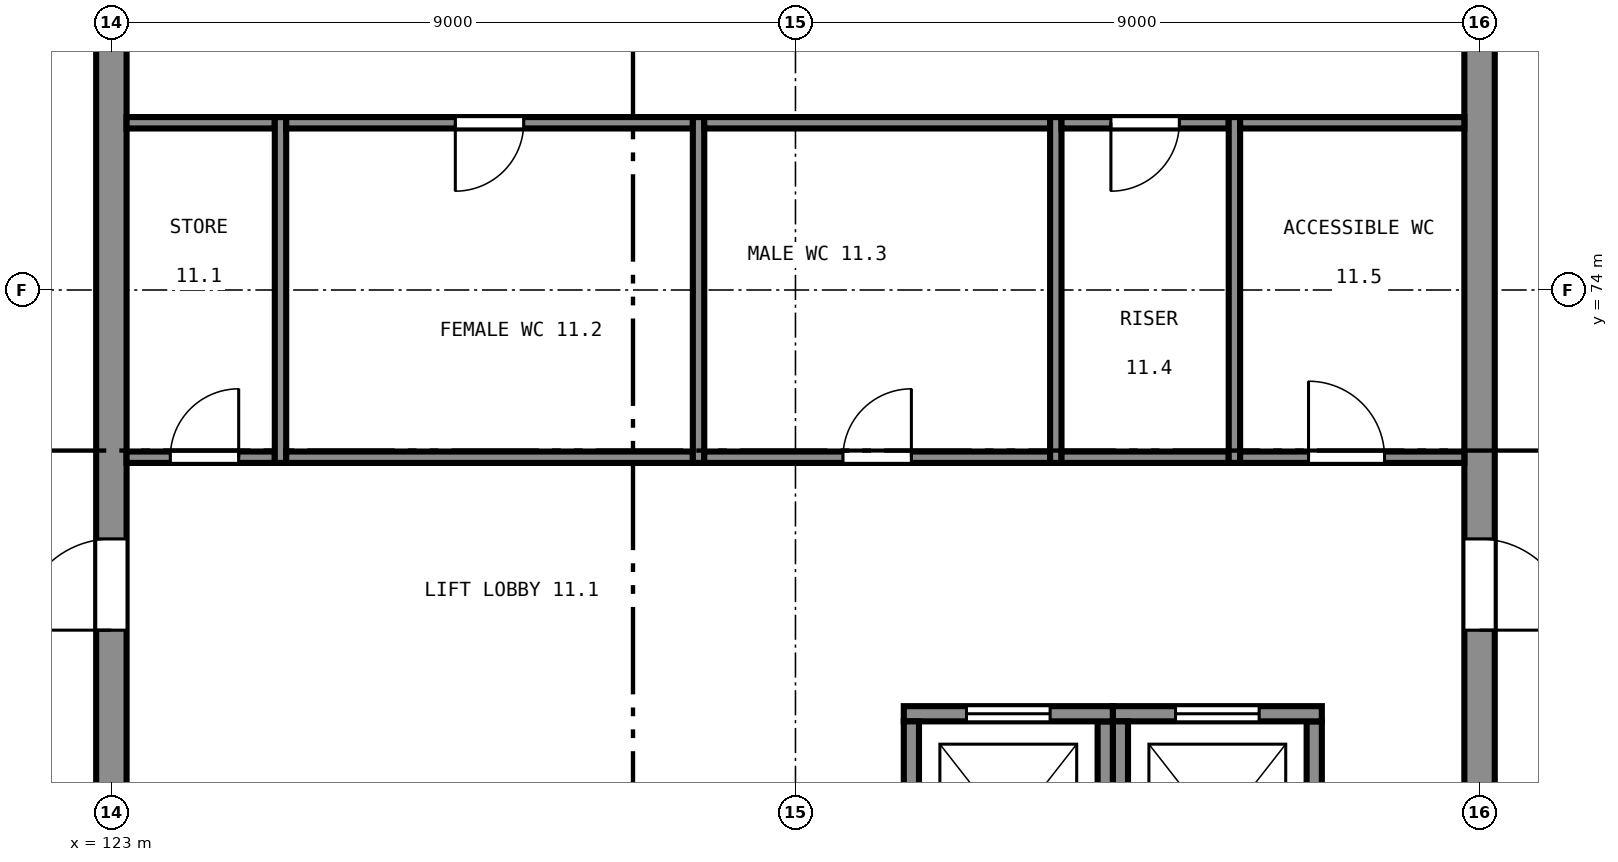
"""IFC4 building model, lengths in metres.
Left out: names, types, materials, properties, quantities, classifications, styles, units other than length and angle.
Written with IfcOpenShell. Run it as: python <this file> out.ifc"""

import sys

from ifc_helpers import new_model, si_unit, direction, frame, frame_2d, origin, place, context, subcontext, project, spatial, rectangle, extrude, element, fill, save


model = new_model("IFC4")
c1 = context("Model", 3, precision=1e-05, world=origin(), true_north=direction((0.0, 1.0)))
c2 = subcontext(c1, "Body", "Model", "MODEL_VIEW")
j1 = project(units=[si_unit("LENGTHUNIT", "METRE"), si_unit("PLANEANGLEUNIT", "RADIAN")], contexts=[c1])
p1 = place(None, origin())
s1 = spatial("IfcSite", under=j1, at=p1, CompositionType="ELEMENT")
p2 = place(p1, origin())
s2 = spatial("IfcBuilding", under=s1, at=p2, CompositionType="ELEMENT")
p3 = place(p2, frame((0.0, 0.0, 45.5)))
s3 = spatial("IfcBuildingStorey", under=s2, at=p3, CompositionType="ELEMENT", Elevation=45.5)
p4 = place(p3, frame((141.0, 65.2, 0.0), z_axis=(0.0, 0.0, 1.0), x_axis=(0.0, 1.0, 0.0)))
e1 = element("IfcWall", 1, at=p4, inside=s3, PredefinedType="SHEAR", context=c2, shape_type="SweptSolid", body=[
    extrude(rectangle(XDim=17.6, YDim=0.4, at=frame_2d((8.8, 0.0))), origin(), (0.0, 0.0, 1.0), 4.0),
])
p5 = place(p4, frame((4.325, 0.0, 0.0)))
e2 = element("IfcOpeningElement", 2, at=p5, cuts=e1, PredefinedType="OPENING", context=c2, shape_type="SweptSolid", body=[
    extrude(rectangle(XDim=1.2, YDim=2.1, at=frame_2d((0.6, 1.05))), frame((0.0, 0.21, 0.0), z_axis=(0.0, -1.0, 0.0), x_axis=(1.0, 0.0, 0.0)), (0.0, 0.0, 1.0), 0.42),
])
p6 = place(p4, frame((12.075, 0.0, 0.0)))
e3 = element("IfcOpeningElement", 3, at=p6, cuts=e1, PredefinedType="OPENING", context=c2, shape_type="SweptSolid", body=[
    extrude(rectangle(XDim=1.2, YDim=2.1, at=frame_2d((0.6, 1.05))), frame((0.0, 0.21, 0.0), z_axis=(0.0, -1.0, 0.0), x_axis=(1.0, 0.0, 0.0)), (0.0, 0.0, 1.0), 0.42),
])
p7 = place(p3, frame((123.0, 82.8, 0.0), z_axis=(0.0, 0.0, 1.0), x_axis=(0.0, -1.0, 0.0)))
e4 = element("IfcWall", 4, at=p7, inside=s3, PredefinedType="SHEAR", context=c2, shape_type="SweptSolid", body=[
    extrude(rectangle(XDim=17.6, YDim=0.4, at=frame_2d((8.8, 0.0))), origin(), (0.0, 0.0, 1.0), 4.0),
])
p8 = place(p7, frame((12.075, 0.0, 0.0)))
e5 = element("IfcOpeningElement", 5, at=p8, cuts=e4, PredefinedType="OPENING", context=c2, shape_type="SweptSolid", body=[
    extrude(rectangle(XDim=1.2, YDim=2.1, at=frame_2d((0.6, 1.05))), frame((0.0, 0.21, 0.0), z_axis=(0.0, -1.0, 0.0), x_axis=(1.0, 0.0, 0.0)), (0.0, 0.0, 1.0), 0.42),
])
p9 = place(p7, frame((4.325, 0.0, 0.0)))
e6 = element("IfcOpeningElement", 6, at=p9, cuts=e4, PredefinedType="OPENING", context=c2, shape_type="SweptSolid", body=[
    extrude(rectangle(XDim=1.2, YDim=2.1, at=frame_2d((0.6, 1.05))), frame((0.0, 0.21, 0.0), z_axis=(0.0, -1.0, 0.0), x_axis=(1.0, 0.0, 0.0)), (0.0, 0.0, 1.0), 0.42),
])
p10 = place(p3, frame((136.075, 65.425, 0.0), z_axis=(0.0, 0.0, 1.0), x_axis=(0.0, 1.0, 0.0)))
e7 = element("IfcWall", 7, at=p10, inside=s3, PredefinedType="SHEAR", context=c2, shape_type="SweptSolid", body=[
    extrude(rectangle(XDim=2.9, YDim=0.2, at=frame_2d((1.45, 0.0))), origin(), (0.0, 0.0, 1.0), 4.0),
])
p11 = place(p3, frame((136.175, 68.425, 0.0), z_axis=(0.0, 0.0, 1.0), x_axis=(-1.0, 0.0, 0.0)))
e8 = element("IfcWall", 8, at=p11, inside=s3, PredefinedType="SHEAR", context=c2, shape_type="SweptSolid", body=[
    extrude(rectangle(XDim=2.75, YDim=0.2, at=frame_2d((1.375, 0.0))), origin(), (0.0, 0.0, 1.0), 4.0),
])
p12 = place(p11, frame((0.825, 0.0, 0.0)))
e9 = element("IfcOpeningElement", 9, at=p12, cuts=e8, PredefinedType="OPENING", context=c2, shape_type="SweptSolid", body=[
    extrude(rectangle(XDim=1.1, YDim=2.1, at=frame_2d((0.55, 1.05))), frame((0.0, 0.11, 0.0), z_axis=(0.0, -1.0, 0.0), x_axis=(1.0, 0.0, 0.0)), (0.0, 0.0, 1.0), 0.22),
])
for number, where, z_axis, x_axis in (
    (10, (133.525, 68.325, 0.0), (0.0, 0.0, 1.0), (0.0, -1.0, 0.0)),
    (11, (138.825, 65.425, 0.0), (0.0, 0.0, 1.0), (0.0, 1.0, 0.0)),
):
    element("IfcWall", number, at=place(p3, frame(where, z_axis=z_axis, x_axis=x_axis)), inside=s3, PredefinedType="SHEAR", context=c2, shape_type="SweptSolid", body=[
        extrude(rectangle(XDim=2.9, YDim=0.2, at=frame_2d((1.45, 0.0))), origin(), (0.0, 0.0, 1.0), 4.0),
    ])
p13 = place(p3, frame((138.925, 68.425, 0.0), z_axis=(0.0, 0.0, 1.0), x_axis=(-1.0, 0.0, 0.0)))
e12 = element("IfcWall", 12, at=p13, inside=s3, PredefinedType="SHEAR", context=c2, shape_type="SweptSolid", body=[
    extrude(rectangle(XDim=2.75, YDim=0.2, at=frame_2d((1.375, 0.0))), origin(), (0.0, 0.0, 1.0), 4.0),
])
p14 = place(p13, frame((0.825, 0.0, 0.0)))
e13 = element("IfcOpeningElement", 13, at=p14, cuts=e12, PredefinedType="OPENING", context=c2, shape_type="SweptSolid", body=[
    extrude(rectangle(XDim=1.1, YDim=2.1, at=frame_2d((0.55, 1.05))), frame((0.0, 0.11, 0.0), z_axis=(0.0, -1.0, 0.0), x_axis=(1.0, 0.0, 0.0)), (0.0, 0.0, 1.0), 0.22),
])
p15 = place(p3, frame((136.275, 68.325, 0.0), z_axis=(0.0, 0.0, 1.0), x_axis=(0.0, -1.0, 0.0)))
e14 = element("IfcWall", 14, at=p15, inside=s3, PredefinedType="SHEAR", context=c2, shape_type="SweptSolid", body=[
    extrude(rectangle(XDim=2.9, YDim=0.2, at=frame_2d((1.45, 0.0))), origin(), (0.0, 0.0, 1.0), 4.0),
])
p16 = place(p3, frame((125.225, 71.725, 0.0), z_axis=(0.0, 0.0, 1.0), x_axis=(0.0, 1.0, 0.0)))
e15 = element("IfcWall", 15, at=p16, inside=s3, PredefinedType="PARTITIONING", context=c2, shape_type="SweptSolid", body=[
    extrude(rectangle(XDim=4.55, YDim=0.15, at=frame_2d((2.275, 0.0))), origin(), (0.0, 0.0, 1.0), 3.75),
])
p17 = place(p3, frame((123.2, 71.8, 0.0), z_axis=(0.0, 0.0, 1.0), x_axis=(1.0, 0.0, 0.0)))
e16 = element("IfcWall", 16, at=p17, inside=s3, PredefinedType="PARTITIONING", context=c2, shape_type="SweptSolid", body=[
    extrude(rectangle(XDim=1.95, YDim=0.15, at=frame_2d((0.975, 0.0))), origin(), (0.0, 0.0, 1.0), 3.75),
])
p18 = place(p17, frame((0.575, 0.0, 0.0)))
e17 = element("IfcOpeningElement", 17, at=p18, cuts=e16, PredefinedType="OPENING", context=c2, shape_type="SweptSolid", body=[
    extrude(rectangle(XDim=0.9, YDim=2.1, at=frame_2d((0.45, 1.05))), frame((0.0, 0.085, 0.0), z_axis=(0.0, -1.0, 0.0), x_axis=(1.0, 0.0, 0.0)), (0.0, 0.0, 1.0), 0.17),
])
p19 = place(p3, frame((123.2, 76.2, 0.0), z_axis=(0.0, 0.0, 1.0), x_axis=(1.0, 0.0, 0.0)))
e18 = element("IfcWall", 18, at=p19, inside=s3, PredefinedType="PARTITIONING", context=c2, shape_type="SweptSolid", body=[
    extrude(rectangle(XDim=1.95, YDim=0.15, at=frame_2d((0.975, 0.0))), origin(), (0.0, 0.0, 1.0), 3.75),
])
p20 = place(p3, frame((130.725, 71.725, 0.0), z_axis=(0.0, 0.0, 1.0), x_axis=(0.0, 1.0, 0.0)))
e19 = element("IfcWall", 19, at=p20, inside=s3, PredefinedType="PARTITIONING", context=c2, shape_type="SweptSolid", body=[
    extrude(rectangle(XDim=4.55, YDim=0.15, at=frame_2d((2.275, 0.0))), origin(), (0.0, 0.0, 1.0), 3.75),
])
p21 = place(p3, frame((125.3, 71.8, 0.0), z_axis=(0.0, 0.0, 1.0), x_axis=(1.0, 0.0, 0.0)))
e20 = element("IfcWall", 20, at=p21, inside=s3, PredefinedType="PARTITIONING", context=c2, shape_type="SweptSolid", body=[
    extrude(rectangle(XDim=5.35, YDim=0.15, at=frame_2d((2.675, 0.0))), origin(), (0.0, 0.0, 1.0), 3.75),
])
p22 = place(p3, frame((125.3, 76.2, 0.0), z_axis=(0.0, 0.0, 1.0), x_axis=(1.0, 0.0, 0.0)))
e21 = element("IfcWall", 21, at=p22, inside=s3, PredefinedType="PARTITIONING", context=c2, shape_type="SweptSolid", body=[
    extrude(rectangle(XDim=5.35, YDim=0.15, at=frame_2d((2.675, 0.0))), origin(), (0.0, 0.0, 1.0), 3.75),
])
p23 = place(p22, frame((2.225, 0.0, 0.0)))
e22 = element("IfcOpeningElement", 22, at=p23, cuts=e21, PredefinedType="OPENING", context=c2, shape_type="SweptSolid", body=[
    extrude(rectangle(XDim=0.9, YDim=2.1, at=frame_2d((0.45, 1.05))), frame((0.0, 0.085, 0.0), z_axis=(0.0, -1.0, 0.0), x_axis=(1.0, 0.0, 0.0)), (0.0, 0.0, 1.0), 0.17),
])
p24 = place(p3, frame((135.425, 71.725, 0.0), z_axis=(0.0, 0.0, 1.0), x_axis=(0.0, 1.0, 0.0)))
e23 = element("IfcWall", 23, at=p24, inside=s3, PredefinedType="PARTITIONING", context=c2, shape_type="SweptSolid", body=[
    extrude(rectangle(XDim=4.55, YDim=0.15, at=frame_2d((2.275, 0.0))), origin(), (0.0, 0.0, 1.0), 3.75),
])
p25 = place(p3, frame((130.8, 71.8, 0.0), z_axis=(0.0, 0.0, 1.0), x_axis=(1.0, 0.0, 0.0)))
e24 = element("IfcWall", 24, at=p25, inside=s3, PredefinedType="PARTITIONING", context=c2, shape_type="SweptSolid", body=[
    extrude(rectangle(XDim=4.55, YDim=0.15, at=frame_2d((2.275, 0.0))), origin(), (0.0, 0.0, 1.0), 3.75),
])
p26 = place(p25, frame((1.825, 0.0, 0.0)))
e25 = element("IfcOpeningElement", 25, at=p26, cuts=e24, PredefinedType="OPENING", context=c2, shape_type="SweptSolid", body=[
    extrude(rectangle(XDim=0.9, YDim=2.1, at=frame_2d((0.45, 1.05))), frame((0.0, 0.085, 0.0), z_axis=(0.0, -1.0, 0.0), x_axis=(1.0, 0.0, 0.0)), (0.0, 0.0, 1.0), 0.17),
])
p27 = place(p3, frame((130.8, 76.2, 0.0), z_axis=(0.0, 0.0, 1.0), x_axis=(1.0, 0.0, 0.0)))
e26 = element("IfcWall", 26, at=p27, inside=s3, PredefinedType="PARTITIONING", context=c2, shape_type="SweptSolid", body=[
    extrude(rectangle(XDim=4.55, YDim=0.15, at=frame_2d((2.275, 0.0))), origin(), (0.0, 0.0, 1.0), 3.75),
])
p28 = place(p3, frame((137.775, 71.725, 0.0), z_axis=(0.0, 0.0, 1.0), x_axis=(0.0, 1.0, 0.0)))
e27 = element("IfcWall", 27, at=p28, inside=s3, PredefinedType="PARTITIONING", context=c2, shape_type="SweptSolid", body=[
    extrude(rectangle(XDim=4.55, YDim=0.15, at=frame_2d((2.275, 0.0))), origin(), (0.0, 0.0, 1.0), 3.75),
])
p29 = place(p3, frame((135.5, 71.8, 0.0), z_axis=(0.0, 0.0, 1.0), x_axis=(1.0, 0.0, 0.0)))
e28 = element("IfcWall", 28, at=p29, inside=s3, PredefinedType="PARTITIONING", context=c2, shape_type="SweptSolid", body=[
    extrude(rectangle(XDim=2.2, YDim=0.15, at=frame_2d((1.1, 0.0))), origin(), (0.0, 0.0, 1.0), 3.75),
])
p30 = place(p3, frame((135.5, 76.2, 0.0), z_axis=(0.0, 0.0, 1.0), x_axis=(1.0, 0.0, 0.0)))
e29 = element("IfcWall", 29, at=p30, inside=s3, PredefinedType="PARTITIONING", context=c2, shape_type="SweptSolid", body=[
    extrude(rectangle(XDim=2.2, YDim=0.15, at=frame_2d((1.1, 0.0))), origin(), (0.0, 0.0, 1.0), 3.75),
])
p31 = place(p30, frame((0.65, 0.0, 0.0)))
e30 = element("IfcOpeningElement", 30, at=p31, cuts=e29, PredefinedType="OPENING", context=c2, shape_type="SweptSolid", body=[
    extrude(rectangle(XDim=0.9, YDim=2.1, at=frame_2d((0.45, 1.05))), frame((0.0, 0.085, 0.0), z_axis=(0.0, -1.0, 0.0), x_axis=(1.0, 0.0, 0.0)), (0.0, 0.0, 1.0), 0.17),
])
p32 = place(p3, frame((137.85, 71.8, 0.0), z_axis=(0.0, 0.0, 1.0), x_axis=(1.0, 0.0, 0.0)))
e31 = element("IfcWall", 31, at=p32, inside=s3, PredefinedType="PARTITIONING", context=c2, shape_type="SweptSolid", body=[
    extrude(rectangle(XDim=2.95, YDim=0.15, at=frame_2d((1.475, 0.0))), origin(), (0.0, 0.0, 1.0), 3.75),
])
p33 = place(p32, frame((0.9, 0.0, 0.0)))
e32 = element("IfcOpeningElement", 32, at=p33, cuts=e31, PredefinedType="OPENING", context=c2, shape_type="SweptSolid", body=[
    extrude(rectangle(XDim=1.0, YDim=2.1, at=frame_2d((0.5, 1.05))), frame((0.0, 0.085, 0.0), z_axis=(0.0, -1.0, 0.0), x_axis=(1.0, 0.0, 0.0)), (0.0, 0.0, 1.0), 0.17),
])
p34 = place(p3, frame((137.85, 76.2, 0.0), z_axis=(0.0, 0.0, 1.0), x_axis=(1.0, 0.0, 0.0)))
e33 = element("IfcWall", 33, at=p34, inside=s3, PredefinedType="PARTITIONING", context=c2, shape_type="SweptSolid", body=[
    extrude(rectangle(XDim=2.95, YDim=0.15, at=frame_2d((1.475, 0.0))), origin(), (0.0, 0.0, 1.0), 3.75),
])
p35 = place(p12, origin())
e34 = element("IfcDoor", 34, at=p35, inside=s3, OperationType="SLIDING_TO_LEFT", PredefinedType="DOOR", context=c2, shape_type="SweptSolid", body=[
    extrude(rectangle(XDim=1.1, YDim=2.1, at=frame_2d((0.55, 1.05))), frame((0.0, 0.025, 0.0), z_axis=(0.0, -1.0, 0.0), x_axis=(1.0, 0.0, 0.0)), (0.0, 0.0, 1.0), 0.05),
])
fill(e9, e34)
p36 = place(p14, origin())
e35 = element("IfcDoor", 35, at=p36, inside=s3, OperationType="SLIDING_TO_LEFT", PredefinedType="DOOR", context=c2, shape_type="SweptSolid", body=[
    extrude(rectangle(XDim=1.1, YDim=2.1, at=frame_2d((0.55, 1.05))), frame((0.0, 0.025, 0.0), z_axis=(0.0, -1.0, 0.0), x_axis=(1.0, 0.0, 0.0)), (0.0, 0.0, 1.0), 0.05),
])
fill(e13, e35)
p37 = place(p8, frame((1.2, 0.0, 0.0), z_axis=(0.0, 0.0, 1.0), x_axis=(-1.0, 0.0, 0.0)))
e36 = element("IfcDoor", 36, at=p37, inside=s3, OperationType="SINGLE_SWING_RIGHT", PredefinedType="DOOR", context=c2, shape_type="SweptSolid", body=[
    extrude(rectangle(XDim=1.2, YDim=2.1, at=frame_2d((0.6, 1.05))), frame((0.0, 0.025, 0.0), z_axis=(0.0, -1.0, 0.0), x_axis=(1.0, 0.0, 0.0)), (0.0, 0.0, 1.0), 0.05),
])
fill(e5, e36)
p38 = place(p5, frame((1.2, 0.0, 0.0), z_axis=(0.0, 0.0, 1.0), x_axis=(-1.0, 0.0, 0.0)))
e37 = element("IfcDoor", 37, at=p38, inside=s3, OperationType="SINGLE_SWING_LEFT", PredefinedType="DOOR", context=c2, shape_type="SweptSolid", body=[
    extrude(rectangle(XDim=1.2, YDim=2.1, at=frame_2d((0.6, 1.05))), frame((0.0, 0.025, 0.0), z_axis=(0.0, -1.0, 0.0), x_axis=(1.0, 0.0, 0.0)), (0.0, 0.0, 1.0), 0.05),
])
fill(e2, e37)
p39 = place(p18, origin())
e38 = element("IfcDoor", 38, at=p39, inside=s3, OperationType="SINGLE_SWING_LEFT", PredefinedType="DOOR", context=c2, shape_type="SweptSolid", body=[
    extrude(rectangle(XDim=0.9, YDim=2.1, at=frame_2d((0.45, 1.05))), frame((0.0, 0.025, 0.0), z_axis=(0.0, -1.0, 0.0), x_axis=(1.0, 0.0, 0.0)), (0.0, 0.0, 1.0), 0.05),
])
fill(e17, e38)
p40 = place(p23, frame((0.9, 0.0, 0.0), z_axis=(0.0, 0.0, 1.0), x_axis=(-1.0, 0.0, 0.0)))
e39 = element("IfcDoor", 39, at=p40, inside=s3, OperationType="SINGLE_SWING_LEFT", PredefinedType="DOOR", context=c2, shape_type="SweptSolid", body=[
    extrude(rectangle(XDim=0.9, YDim=2.1, at=frame_2d((0.45, 1.05))), frame((0.0, 0.025, 0.0), z_axis=(0.0, -1.0, 0.0), x_axis=(1.0, 0.0, 0.0)), (0.0, 0.0, 1.0), 0.05),
])
fill(e22, e39)
p41 = place(p26, origin())
e40 = element("IfcDoor", 40, at=p41, inside=s3, OperationType="SINGLE_SWING_LEFT", PredefinedType="DOOR", context=c2, shape_type="SweptSolid", body=[
    extrude(rectangle(XDim=0.9, YDim=2.1, at=frame_2d((0.45, 1.05))), frame((0.0, 0.025, 0.0), z_axis=(0.0, -1.0, 0.0), x_axis=(1.0, 0.0, 0.0)), (0.0, 0.0, 1.0), 0.05),
])
fill(e25, e40)
p42 = place(p31, frame((0.9, 0.0, 0.0), z_axis=(0.0, 0.0, 1.0), x_axis=(-1.0, 0.0, 0.0)))
e41 = element("IfcDoor", 41, at=p42, inside=s3, OperationType="SINGLE_SWING_LEFT", PredefinedType="DOOR", context=c2, shape_type="SweptSolid", body=[
    extrude(rectangle(XDim=0.9, YDim=2.1, at=frame_2d((0.45, 1.05))), frame((0.0, 0.025, 0.0), z_axis=(0.0, -1.0, 0.0), x_axis=(1.0, 0.0, 0.0)), (0.0, 0.0, 1.0), 0.05),
])
fill(e30, e41)
p43 = place(p33, origin())
e42 = element("IfcDoor", 42, at=p43, inside=s3, OperationType="SINGLE_SWING_RIGHT", PredefinedType="DOOR", context=c2, shape_type="SweptSolid", body=[
    extrude(rectangle(XDim=1.0, YDim=2.1, at=frame_2d((0.5, 1.05))), frame((0.0, 0.025, 0.0), z_axis=(0.0, -1.0, 0.0), x_axis=(1.0, 0.0, 0.0)), (0.0, 0.0, 1.0), 0.05),
])
fill(e32, e42)
save(model, sys.argv[1])
